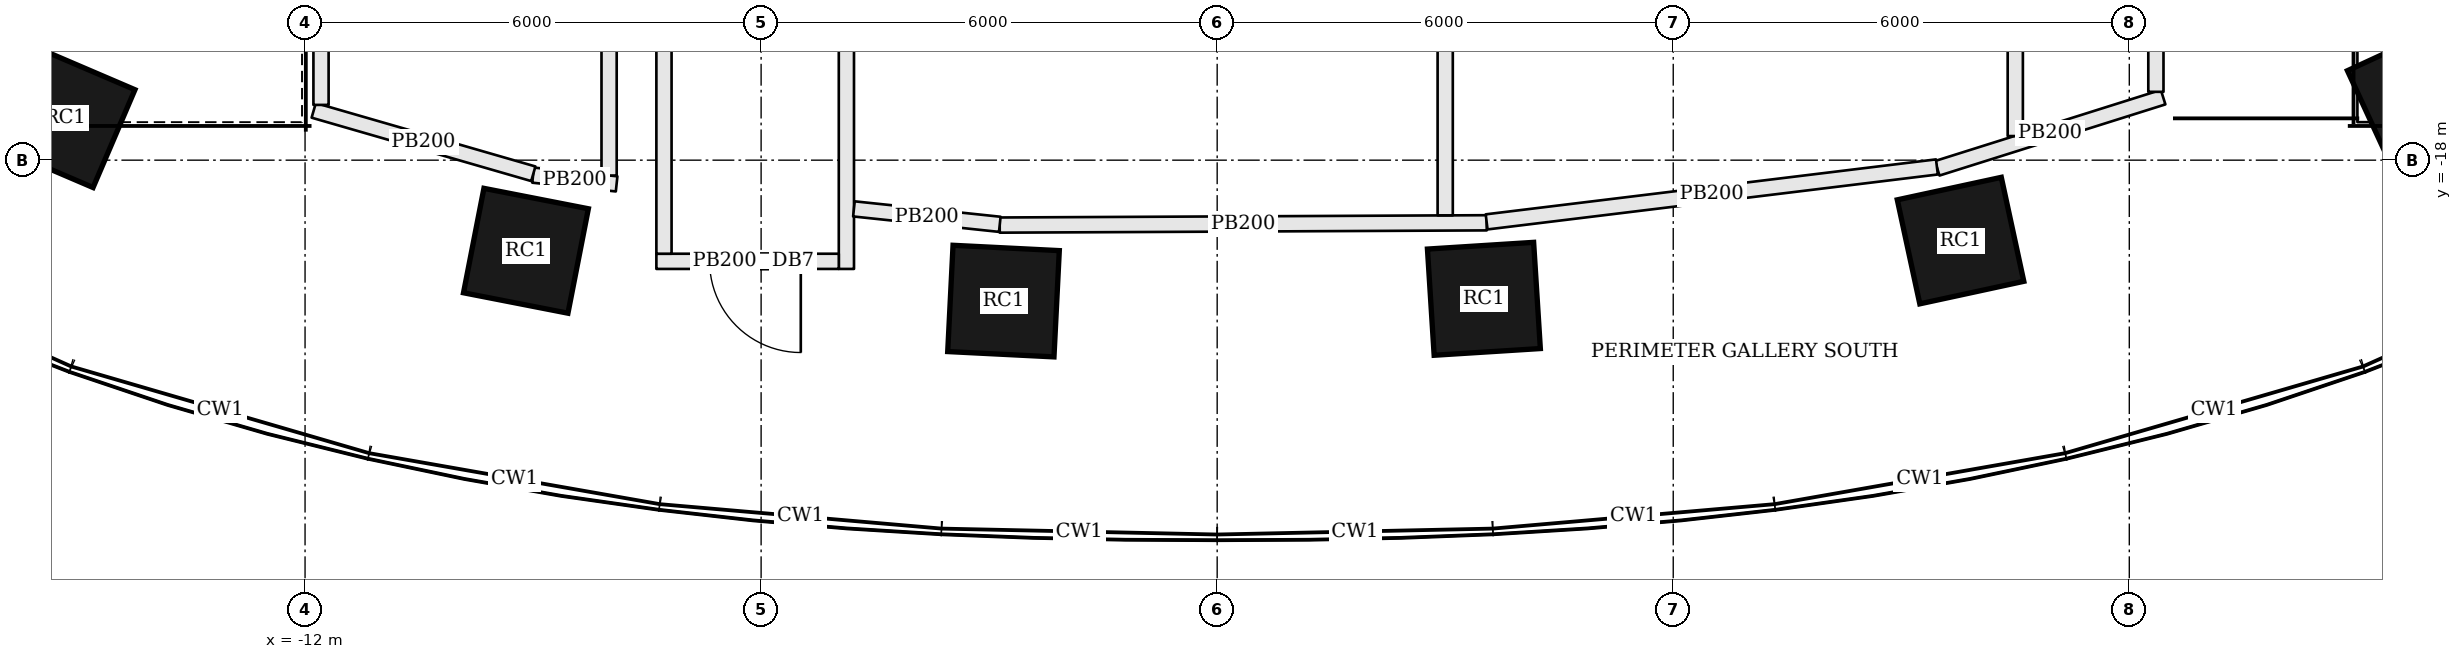
"""IFC4 building model, lengths in metres.
Left out: names, types, materials, properties, quantities, classifications, styles, units other than length and angle.
Written with IfcOpenShell. Run it as: python <this file> out.ifc"""

import sys

from ifc_helpers import new_model, si_unit, direction, frame, frame_2d, origin, origin_2d, place, context, subcontext, project, spatial, rectangle, extrude, element, fill, save


model = new_model("IFC4")
c1 = context("Model", 3, precision=1e-05, world=origin(), true_north=direction((0.0, 1.0)))
c2 = subcontext(c1, "Body", "Model", "MODEL_VIEW")
j1 = project(units=[si_unit("LENGTHUNIT", "METRE"), si_unit("PLANEANGLEUNIT", "RADIAN")], contexts=[c1])
p1 = place(None, origin())
s1 = spatial("IfcSite", under=j1, at=p1, CompositionType="ELEMENT")
p2 = place(p1, origin())
s2 = spatial("IfcBuilding", under=s1, at=p2, CompositionType="ELEMENT")
p3 = place(p2, frame((0.0, 0.0, 28.2)))
s3 = spatial("IfcBuildingStorey", under=s2, at=p3, CompositionType="ELEMENT", Elevation=28.2)
for number, where, z_axis, x_axis in (
    (1, (-15.157, -17.441, 0.0), (0.0, 0.0, 1.0), (0.919, -0.394, 0.0)),
    (2, (-9.094, -19.192, 0.0), (0.0, 0.0, 1.0), (0.981, -0.192, 0.0)),
    (3, (-2.811, -19.854, 0.0), (0.0, 0.0, 1.0), (0.999, -0.05, 0.0)),
    (4, (3.509, -19.824, 0.0), (0.0, 0.0, 1.0), (0.998, 0.063, 0.0)),
    (5, (9.78, -19.058, 0.0), (0.0, 0.0, 1.0), (0.977, 0.211, 0.0)),
    (6, (15.799, -17.165, 0.0), (0.0, 0.0, 1.0), (0.908, 0.419, 0.0)),
):
    element("IfcColumn", number, at=place(p3, frame(where, z_axis=z_axis, x_axis=x_axis)), inside=s3, PredefinedType="COLUMN", context=c2, shape_type="SweptSolid", body=[
        extrude(rectangle(XDim=1.4, YDim=1.4, at=origin_2d()), origin(), (0.0, 0.0, 1.0), 4.8),
    ])
p4 = place(p3, frame((-4.878, -6.1, 0.0), z_axis=(0.0, 0.0, 1.0), x_axis=(0.0, -1.0, 0.0)))
e7 = element("IfcWall", 7, at=p4, inside=s3, PredefinedType="PARTITIONING", context=c2, shape_type="SweptSolid", body=[
    extrude(rectangle(XDim=13.331, YDim=0.2, at=frame_2d((6.666, 0.0))), origin(), (0.0, 0.0, 1.0), 3.78),
])
p5 = place(p3, frame((-4.978, -19.331, 0.0), z_axis=(0.0, 0.0, 1.0), x_axis=(-1.0, 0.0, 0.0)))
e8 = element("IfcWall", 8, at=p5, inside=s3, PredefinedType="PARTITIONING", context=c2, shape_type="SweptSolid", body=[
    extrude(rectangle(XDim=2.4, YDim=0.2, at=frame_2d((1.2, 0.0))), origin(), (0.0, 0.0, 1.0), 3.78),
])
p6 = place(p5, frame((0.5, 0.0, 0.0)))
e9 = element("IfcOpeningElement", 9, at=p6, cuts=e8, PredefinedType="OPENING", context=c2, shape_type="SweptSolid", body=[
    extrude(rectangle(XDim=1.2, YDim=2.1, at=frame_2d((0.6, 1.05))), frame((0.0, 0.11, 0.0), z_axis=(0.0, -1.0, 0.0), x_axis=(1.0, 0.0, 0.0)), (0.0, 0.0, 1.0), 0.22),
])
p7 = place(p3, frame((-7.278, -19.231, 0.0), z_axis=(0.0, 0.0, 1.0), x_axis=(0.0, 1.0, 0.0)))
e10 = element("IfcWall", 10, at=p7, inside=s3, PredefinedType="PARTITIONING", context=c2, shape_type="SweptSolid", body=[
    extrude(rectangle(XDim=13.131, YDim=0.2, at=frame_2d((6.565, 0.0))), origin(), (0.0, 0.0, 1.0), 3.78),
])
p8 = place(p3, frame((-7.901, -18.312, 0.0), z_axis=(0.0, 0.0, 1.0), x_axis=(-0.994571829754, 0.104052272726, 0.0)))
e11 = element("IfcWall", 11, at=p8, inside=s3, PredefinedType="PARTITIONING", context=c2, shape_type="SweptSolid", body=[
    extrude(rectangle(XDim=1.105, YDim=0.2, at=frame_2d((0.553, 0.0))), origin(), (0.0, 0.0, 1.0), 3.78),
])
p9 = place(p3, frame((-8.997, -18.179, 0.0), z_axis=(0.0, 0.0, 1.0), x_axis=(-0.960766604917, 0.277358127474, 0.0)))
e12 = element("IfcWall", 12, at=p9, inside=s3, PredefinedType="PARTITIONING", context=c2, shape_type="SweptSolid", body=[
    extrude(rectangle(XDim=3.007, YDim=0.2, at=frame_2d((1.503, 0.0))), origin(), (0.0, 0.0, 1.0), 3.78),
])
p10 = place(p3, frame((-11.79, -17.273, 0.0), z_axis=(0.0, 0.0, 1.0), x_axis=(0.0, 1.0, 0.0)))
e13 = element("IfcWall", 13, at=p10, inside=s3, PredefinedType="PARTITIONING", context=c2, shape_type="SweptSolid", body=[
    extrude(rectangle(XDim=4.723, YDim=0.2, at=frame_2d((2.361, 0.0))), origin(), (0.0, 0.0, 1.0), 3.78),
])
p11 = place(p3, frame((-8.0, -6.1, 0.0), z_axis=(0.0, 0.0, 1.0), x_axis=(0.0, -1.0, 0.0)))
e14 = element("IfcWall", 14, at=p11, inside=s3, PredefinedType="PARTITIONING", context=c2, shape_type="SweptSolid", body=[
    extrude(rectangle(XDim=12.102, YDim=0.2, at=frame_2d((6.051, 0.0))), origin(), (0.0, 0.0, 1.0), 3.78),
])
p12 = place(p3, frame((3.546, -18.824, 0.0), z_axis=(0.0, 0.0, 1.0), x_axis=(-0.999989016365, -0.004686912663, 0.0)))
e15 = element("IfcWall", 15, at=p12, inside=s3, PredefinedType="PARTITIONING", context=c2, shape_type="SweptSolid", body=[
    extrude(rectangle(XDim=6.407, YDim=0.2, at=frame_2d((3.204, 0.0))), origin(), (0.0, 0.0, 1.0), 3.78),
])
p13 = place(p3, frame((-2.86, -18.844, 0.0), z_axis=(0.0, 0.0, 1.0), x_axis=(-0.994457513639, 0.105139210412, 0.0)))
e16 = element("IfcWall", 16, at=p13, inside=s3, PredefinedType="PARTITIONING", context=c2, shape_type="SweptSolid", body=[
    extrude(rectangle(XDim=1.93, YDim=0.2, at=frame_2d((0.965, 0.0))), origin(), (0.0, 0.0, 1.0), 3.78),
])
p14 = place(p3, frame((3.0, -6.1, 0.0), z_axis=(0.0, 0.0, 1.0), x_axis=(0.0, -1.0, 0.0)))
e17 = element("IfcWall", 17, at=p14, inside=s3, PredefinedType="PARTITIONING", context=c2, shape_type="SweptSolid", body=[
    extrude(rectangle(XDim=12.626, YDim=0.2, at=frame_2d((6.313, 0.0))), origin(), (0.0, 0.0, 1.0), 3.78),
])
p15 = place(p3, frame((12.445, -17.171, 0.0), z_axis=(0.0, 0.0, 1.0), x_axis=(-0.953816830096, -0.300388839049, 0.0)))
e18 = element("IfcWall", 18, at=p15, inside=s3, PredefinedType="PARTITIONING", context=c2, shape_type="SweptSolid", body=[
    extrude(rectangle(XDim=3.116, YDim=0.2, at=frame_2d((1.558, 0.0))), origin(), (0.0, 0.0, 1.0), 3.78),
])
p16 = place(p3, frame((9.469, -18.089, 0.0), z_axis=(0.0, 0.0, 1.0), x_axis=(-0.992636762719, -0.121129093526, 0.0)))
e19 = element("IfcWall", 19, at=p16, inside=s3, PredefinedType="PARTITIONING", context=c2, shape_type="SweptSolid", body=[
    extrude(rectangle(XDim=5.968, YDim=0.2, at=frame_2d((2.984, 0.0))), origin(), (0.0, 0.0, 1.0), 3.78),
])
p17 = place(p3, frame((10.5, -6.1, 0.0), z_axis=(0.0, 0.0, 1.0), x_axis=(0.0, -1.0, 0.0)))
e20 = element("IfcWall", 20, at=p17, inside=s3, PredefinedType="PARTITIONING", context=c2, shape_type="SweptSolid", body=[
    extrude(rectangle(XDim=11.583, YDim=0.2, at=frame_2d((5.792, 0.0))), origin(), (0.0, 0.0, 1.0), 3.78),
])
p18 = place(p3, frame((12.35, -12.55, 0.0), z_axis=(0.0, 0.0, 1.0), x_axis=(0.0, -1.0, 0.0)))
e21 = element("IfcWall", 21, at=p18, inside=s3, PredefinedType="PARTITIONING", context=c2, shape_type="SweptSolid", body=[
    extrude(rectangle(XDim=4.551, YDim=0.2, at=frame_2d((2.275, 0.0))), origin(), (0.0, 0.0, 1.0), 3.78),
])
p19 = place(p6, origin())
e22 = element("IfcDoor", 22, at=p19, inside=s3, OperationType="SINGLE_SWING_LEFT", PredefinedType="DOOR", context=c2, shape_type="SweptSolid", body=[
    extrude(rectangle(XDim=1.2, YDim=2.1, at=frame_2d((0.6, 1.05))), frame((0.0, 0.025, 0.0), z_axis=(0.0, -1.0, 0.0), x_axis=(1.0, 0.0, 0.0)), (0.0, 0.0, 1.0), 0.05),
])
fill(e9, e22)
save(model, sys.argv[1])
